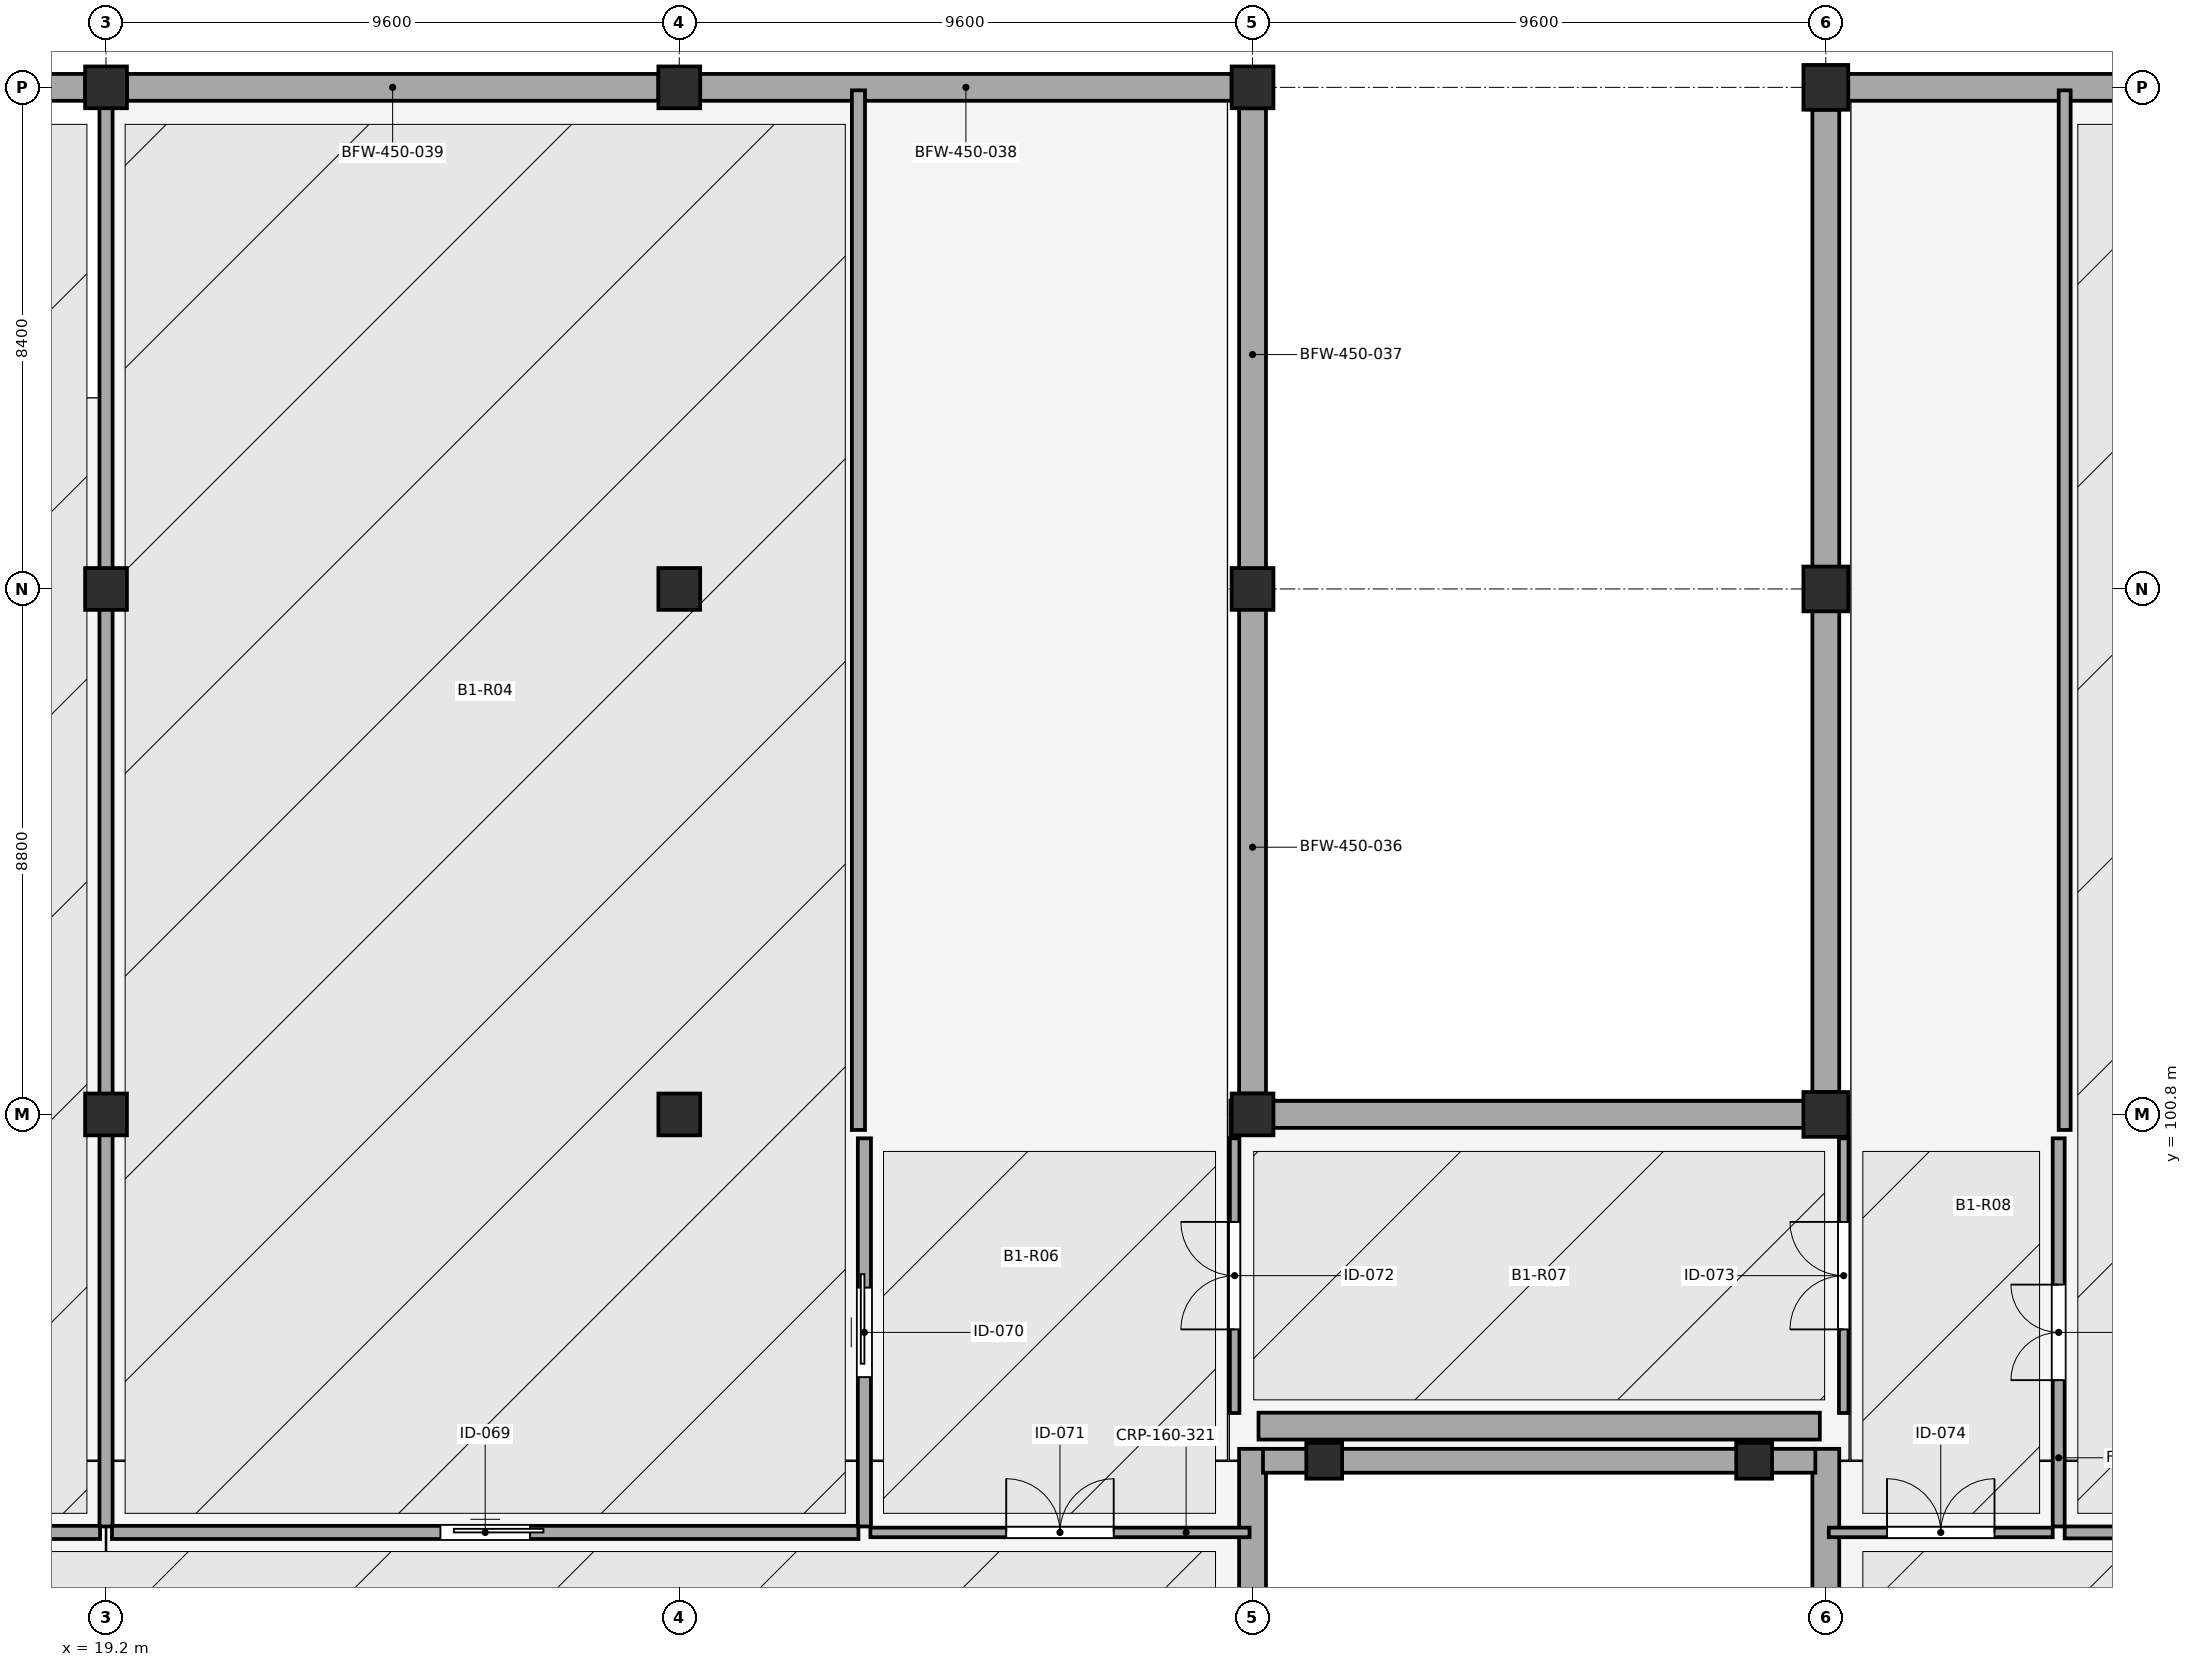
"""IFC4 building model, lengths in metres.
Left out: names, types, materials, properties, quantities, classifications, styles, units other than length and angle.
Written with IfcOpenShell. Run it as: python <this file> out.ifc"""

import sys

from ifc_helpers import new_model, si_unit, direction, frame, frame_2d, origin, origin_2d, place, context, subcontext, project, spatial, rectangle, extrude, element, fill, save


model = new_model("IFC4")
c1 = context("Model", 3, precision=1e-05, world=origin(), true_north=direction((0.0, 1.0)))
c2 = subcontext(c1, "Body", "Model", "MODEL_VIEW")
j1 = project(units=[si_unit("LENGTHUNIT", "METRE"), si_unit("PLANEANGLEUNIT", "RADIAN")], contexts=[c1])
p1 = place(None, origin())
s1 = spatial("IfcSite", under=j1, at=p1, CompositionType="ELEMENT")
p2 = place(p1, origin())
s2 = spatial("IfcBuilding", under=s1, at=p2, CompositionType="ELEMENT")
p3 = place(p2, frame((0.0, 0.0, -4.2)))
s3 = spatial("IfcBuildingStorey", under=s2, at=p3, CompositionType="ELEMENT", Elevation=-4.2)
for number, where, z_axis, x_axis in (
    (1, (19.2, 100.8, 0.0), (0.0, 0.0, 1.0), (1.0, 0.0, 0.0)),
    (2, (19.2, 109.6, 0.0), (0.0, 0.0, 1.0), (1.0, 0.0, 0.0)),
    (3, (19.2, 118.0, 0.0), (0.0, 0.0, 1.0), (1.0, 0.0, 0.0)),
    (4, (28.8, 100.8, 0.0), (0.0, 0.0, 1.0), (1.0, 0.0, 0.0)),
    (5, (28.8, 109.6, 0.0), (0.0, 0.0, 1.0), (1.0, 0.0, 0.0)),
    (6, (28.8, 118.0, 0.0), (0.0, 0.0, 1.0), (1.0, 0.0, 0.0)),
    (7, (38.4, 100.8, 0.0), (0.0, 0.0, 1.0), (1.0, 0.0, 0.0)),
    (8, (38.4, 109.6, 0.0), (0.0, 0.0, 1.0), (1.0, 0.0, 0.0)),
    (9, (38.4, 118.0, 0.0), (0.0, 0.0, 1.0), (1.0, 0.0, 0.0)),
):
    element("IfcColumn", number, at=place(p3, frame(where, z_axis=z_axis, x_axis=x_axis)), inside=s3, PredefinedType="COLUMN", context=c2, shape_type="SweptSolid", body=[
        extrude(rectangle(XDim=0.7, YDim=0.7, at=origin_2d()), origin(), (0.0, 0.0, 1.0), 4.2),
    ])
for number, where, z_axis, x_axis in (
    (10, (48.0, 100.8, 0.0), (0.0, 0.0, 1.0), (1.0, 0.0, 0.0)),
    (11, (48.0, 109.6, 0.0), (0.0, 0.0, 1.0), (1.0, 0.0, 0.0)),
    (12, (48.0, 118.0, 0.0), (0.0, 0.0, 1.0), (1.0, 0.0, 0.0)),
):
    element("IfcColumn", number, at=place(p3, frame(where, z_axis=z_axis, x_axis=x_axis)), inside=s3, PredefinedType="COLUMN", context=c2, shape_type="SweptSolid", body=[
        extrude(rectangle(XDim=0.75, YDim=0.75, at=origin_2d()), origin(), (0.0, 0.0, 1.0), 4.2),
    ])
for number, where, z_axis, x_axis in (
    (13, (39.6, 95.0, 0.0), (0.0, 0.0, 1.0), (1.0, 0.0, 0.0)),
    (14, (46.8, 95.0, 0.0), (0.0, 0.0, 1.0), (1.0, 0.0, 0.0)),
):
    element("IfcColumn", number, at=place(p3, frame(where, z_axis=z_axis, x_axis=x_axis)), inside=s3, PredefinedType="COLUMN", context=c2, shape_type="SweptSolid", body=[
        extrude(rectangle(XDim=0.6, YDim=0.6, at=origin_2d()), origin(), (0.0, 0.0, 1.0), 4.2),
    ])
p4 = place(p3, frame((38.4, 87.467, 0.0), z_axis=(0.0, 0.0, 1.0), x_axis=(0.0, 1.0, 0.0)))
e15 = element("IfcWall", 15, at=p4, inside=s3, PredefinedType="SOLIDWALL", context=c2, shape_type="SweptSolid", body=[
    extrude(rectangle(XDim=7.733, YDim=0.45, at=frame_2d((3.866, 0.0))), origin(), (0.0, 0.0, 1.0), 3.84),
])
for number, where, z_axis, x_axis in (
    (16, (38.4, 101.15, 0.0), (0.0, 0.0, 1.0), (0.0, 1.0, 0.0)),
    (17, (38.4, 109.4, 0.0), (0.0, 0.0, 1.0), (0.0, 1.0, 0.0)),
):
    element("IfcWall", number, at=place(p3, frame(where, z_axis=z_axis, x_axis=x_axis)), inside=s3, PredefinedType="SOLIDWALL", context=c2, shape_type="SweptSolid", body=[
        extrude(rectangle(XDim=8.25, YDim=0.45, at=frame_2d((4.125, 0.0))), origin(), (0.0, 0.0, 1.0), 3.84),
    ])
p5 = place(p3, frame((38.05, 118.0, 0.0), z_axis=(0.0, 0.0, 1.0), x_axis=(-1.0, 0.0, 0.0)))
e18 = element("IfcWall", 18, at=p5, inside=s3, PredefinedType="SOLIDWALL", context=c2, shape_type="SweptSolid", body=[
    extrude(rectangle(XDim=8.9, YDim=0.45, at=frame_2d((4.45, 0.0))), origin(), (0.0, 0.0, 1.0), 3.84),
])
p6 = place(p3, frame((28.45, 118.0, 0.0), z_axis=(0.0, 0.0, 1.0), x_axis=(-1.0, 0.0, 0.0)))
e19 = element("IfcWall", 19, at=p6, inside=s3, PredefinedType="SOLIDWALL", context=c2, shape_type="SweptSolid", body=[
    extrude(rectangle(XDim=8.9, YDim=0.45, at=frame_2d((4.45, 0.0))), origin(), (0.0, 0.0, 1.0), 3.84),
])
p7 = place(p3, frame((18.85, 118.0, 0.0), z_axis=(0.0, 0.0, 1.0), x_axis=(-1.0, 0.0, 0.0)))
e20 = element("IfcWall", 20, at=p7, inside=s3, PredefinedType="SOLIDWALL", context=c2, shape_type="SweptSolid", body=[
    extrude(rectangle(XDim=8.9, YDim=0.45, at=frame_2d((4.45, 0.0))), origin(), (0.0, 0.0, 1.0), 3.84),
])
p8 = place(p3, frame((57.225, 118.0, 0.0), z_axis=(0.0, 0.0, 1.0), x_axis=(-1.0, 0.0, 0.0)))
e21 = element("IfcWall", 21, at=p8, inside=s3, PredefinedType="SOLIDWALL", context=c2, shape_type="SweptSolid", body=[
    extrude(rectangle(XDim=8.85, YDim=0.45, at=frame_2d((4.425, 0.0))), origin(), (0.0, 0.0, 1.0), 3.84),
])
p9 = place(p3, frame((48.0, 117.625, 0.0), z_axis=(0.0, 0.0, 1.0), x_axis=(0.0, -1.0, 0.0)))
e22 = element("IfcWall", 22, at=p9, inside=s3, PredefinedType="SOLIDWALL", context=c2, shape_type="SweptSolid", body=[
    extrude(rectangle(XDim=8.225, YDim=0.45, at=frame_2d((4.113, 0.0))), origin(), (0.0, 0.0, 1.0), 3.84),
])
p10 = place(p3, frame((48.0, 109.4, 0.0), z_axis=(0.0, 0.0, 1.0), x_axis=(0.0, -1.0, 0.0)))
e23 = element("IfcWall", 23, at=p10, inside=s3, PredefinedType="SOLIDWALL", context=c2, shape_type="SweptSolid", body=[
    extrude(rectangle(XDim=8.225, YDim=0.45, at=frame_2d((4.112, 0.0))), origin(), (0.0, 0.0, 1.0), 3.84),
])
p11 = place(p3, frame((48.0, 95.2, 0.0), z_axis=(0.0, 0.0, 1.0), x_axis=(0.0, -1.0, 0.0)))
e24 = element("IfcWall", 24, at=p11, inside=s3, PredefinedType="SOLIDWALL", context=c2, shape_type="SweptSolid", body=[
    extrude(rectangle(XDim=7.733, YDim=0.45, at=frame_2d((3.866, 0.0))), origin(), (0.0, 0.0, 1.0), 3.84),
])
for number, where, z_axis, x_axis in (
    (25, (38.5, 95.58, 0.0), (0.0, 0.0, 1.0), (1.0, 0.0, 0.0)),
    (26, (38.5, 100.8, 0.0), (0.0, 0.0, 1.0), (1.0, 0.0, 0.0)),
):
    element("IfcWall", number, at=place(p3, frame(where, z_axis=z_axis, x_axis=x_axis)), inside=s3, PredefinedType="SOLIDWALL", context=c2, shape_type="SweptSolid", body=[
        extrude(rectangle(XDim=9.4, YDim=0.45, at=frame_2d((4.7, 0.0))), origin(), (0.0, 0.0, 1.0), 3.84),
    ])
p12 = place(p3, frame((38.575, 95.0, 0.0), z_axis=(0.0, 0.0, 1.0), x_axis=(1.0, 0.0, 0.0)))
e27 = element("IfcWall", 27, at=p12, inside=s3, PredefinedType="SOLIDWALL", context=c2, shape_type="SweptSolid", body=[
    extrude(rectangle(XDim=9.25, YDim=0.4, at=frame_2d((4.625, 0.0))), origin(), (0.0, 0.0, 1.0), 9.0),
])
p13 = place(p3, frame((19.2, 93.9, 0.0), z_axis=(0.0, 0.0, 1.0), x_axis=(0.0, 1.0, 0.0)))
e28 = element("IfcWall", 28, at=p13, inside=s3, PredefinedType="PARTITIONING", context=c2, shape_type="SweptSolid", body=[
    extrude(rectangle(XDim=24.05, YDim=0.22, at=frame_2d((12.025, 0.0))), origin(), (0.0, 0.0, 1.0), 2.952),
])
p14 = place(p3, frame((0.05, 93.8, 0.0), z_axis=(0.0, 0.0, 1.0), x_axis=(1.0, 0.0, 0.0)))
e29 = element("IfcWall", 29, at=p14, inside=s3, PredefinedType="PARTITIONING", context=c2, shape_type="SweptSolid", body=[
    extrude(rectangle(XDim=19.05, YDim=0.22, at=frame_2d((9.525, 0.0))), origin(), (0.0, 0.0, 1.0), 3.84),
])
p15 = place(p14, frame((8.775, 0.0, 0.0)))
e30 = element("IfcOpeningElement", 30, at=p15, cuts=e29, PredefinedType="OPENING", context=c2, shape_type="SweptSolid", body=[
    extrude(rectangle(XDim=1.5, YDim=2.2, at=frame_2d((0.75, 1.1))), frame((0.0, 0.12, 0.0), z_axis=(0.0, -1.0, 0.0), x_axis=(1.0, 0.0, 0.0)), (0.0, 0.0, 1.0), 0.24),
])
p16 = place(p3, frame((19.3, 93.8, 0.0), z_axis=(0.0, 0.0, 1.0), x_axis=(1.0, 0.0, 0.0)))
e31 = element("IfcWall", 31, at=p16, inside=s3, PredefinedType="PARTITIONING", context=c2, shape_type="SweptSolid", body=[
    extrude(rectangle(XDim=12.5, YDim=0.22, at=frame_2d((6.25, 0.0))), origin(), (0.0, 0.0, 1.0), 3.84),
])
p17 = place(p16, frame((5.5, 0.0, 0.0)))
e32 = element("IfcOpeningElement", 32, at=p17, cuts=e31, PredefinedType="OPENING", context=c2, shape_type="SweptSolid", body=[
    extrude(rectangle(XDim=1.5, YDim=2.2, at=frame_2d((0.75, 1.1))), frame((0.0, 0.12, 0.0), z_axis=(0.0, -1.0, 0.0), x_axis=(1.0, 0.0, 0.0)), (0.0, 0.0, 1.0), 0.24),
])
p18 = place(p3, frame((31.9, 93.9, 0.0), z_axis=(0.0, 0.0, 1.0), x_axis=(0.0, 1.0, 0.0)))
e33 = element("IfcWall", 33, at=p18, inside=s3, PredefinedType="PARTITIONING", context=c2, shape_type="SweptSolid", body=[
    extrude(rectangle(XDim=6.5, YDim=0.22, at=frame_2d((3.25, 0.0))), origin(), (0.0, 0.0, 1.0), 3.84),
])
p19 = place(p18, frame((2.5, 0.0, 0.0)))
e34 = element("IfcOpeningElement", 34, at=p19, cuts=e33, PredefinedType="OPENING", context=c2, shape_type="SweptSolid", body=[
    extrude(rectangle(XDim=1.5, YDim=2.2, at=frame_2d((0.75, 1.1))), frame((0.0, 0.12, 0.0), z_axis=(0.0, -1.0, 0.0), x_axis=(1.0, 0.0, 0.0)), (0.0, 0.0, 1.0), 0.24),
])
p20 = place(p3, frame((32.0, 93.8, 0.0), z_axis=(0.0, 0.0, 1.0), x_axis=(1.0, 0.0, 0.0)))
e35 = element("IfcWall", 35, at=p20, inside=s3, PredefinedType="PARTITIONING", context=c2, shape_type="SweptSolid", body=[
    extrude(rectangle(XDim=6.35, YDim=0.16, at=frame_2d((3.175, 0.0))), origin(), (0.0, 0.0, 1.0), 3.84),
])
p21 = place(p20, frame((2.275, 0.0, 0.0)))
e36 = element("IfcOpeningElement", 36, at=p21, cuts=e35, PredefinedType="OPENING", context=c2, shape_type="SweptSolid", body=[
    extrude(rectangle(XDim=1.8, YDim=2.15, at=frame_2d((0.9, 1.075))), frame((0.0, 0.09, 0.0), z_axis=(0.0, -1.0, 0.0), x_axis=(1.0, 0.0, 0.0)), (0.0, 0.0, 1.0), 0.18),
])
p22 = place(p3, frame((38.1, 95.8, 0.0), z_axis=(0.0, 0.0, 1.0), x_axis=(0.0, 1.0, 0.0)))
e37 = element("IfcWall", 37, at=p22, inside=s3, PredefinedType="PARTITIONING", context=c2, shape_type="SweptSolid", body=[
    extrude(rectangle(XDim=4.6, YDim=0.16, at=frame_2d((2.3, 0.0))), origin(), (0.0, 0.0, 1.0), 3.84),
])
p23 = place(p22, frame((1.4, 0.0, 0.0)))
e38 = element("IfcOpeningElement", 38, at=p23, cuts=e37, PredefinedType="OPENING", context=c2, shape_type="SweptSolid", body=[
    extrude(rectangle(XDim=1.8, YDim=2.15, at=frame_2d((0.9, 1.075))), frame((0.0, 0.09, 0.0), z_axis=(0.0, -1.0, 0.0), x_axis=(1.0, 0.0, 0.0)), (0.0, 0.0, 1.0), 0.18),
])
p24 = place(p3, frame((48.3, 95.8, 0.0), z_axis=(0.0, 0.0, 1.0), x_axis=(0.0, 1.0, 0.0)))
e39 = element("IfcWall", 39, at=p24, inside=s3, PredefinedType="PARTITIONING", context=c2, shape_type="SweptSolid", body=[
    extrude(rectangle(XDim=4.6, YDim=0.16, at=frame_2d((2.3, 0.0))), origin(), (0.0, 0.0, 1.0), 3.84),
])
p25 = place(p24, frame((1.4, 0.0, 0.0)))
e40 = element("IfcOpeningElement", 40, at=p25, cuts=e39, PredefinedType="OPENING", context=c2, shape_type="SweptSolid", body=[
    extrude(rectangle(XDim=1.8, YDim=2.15, at=frame_2d((0.9, 1.075))), frame((0.0, 0.09, 0.0), z_axis=(0.0, -1.0, 0.0), x_axis=(1.0, 0.0, 0.0)), (0.0, 0.0, 1.0), 0.18),
])
p26 = place(p3, frame((48.05, 93.8, 0.0), z_axis=(0.0, 0.0, 1.0), x_axis=(1.0, 0.0, 0.0)))
e41 = element("IfcWall", 41, at=p26, inside=s3, PredefinedType="PARTITIONING", context=c2, shape_type="SweptSolid", body=[
    extrude(rectangle(XDim=3.75, YDim=0.16, at=frame_2d((1.875, 0.0))), origin(), (0.0, 0.0, 1.0), 3.84),
])
p27 = place(p26, frame((0.975, 0.0, 0.0)))
e42 = element("IfcOpeningElement", 42, at=p27, cuts=e41, PredefinedType="OPENING", context=c2, shape_type="SweptSolid", body=[
    extrude(rectangle(XDim=1.8, YDim=2.15, at=frame_2d((0.9, 1.075))), frame((0.0, 0.09, 0.0), z_axis=(0.0, -1.0, 0.0), x_axis=(1.0, 0.0, 0.0)), (0.0, 0.0, 1.0), 0.18),
])
p28 = place(p3, frame((51.9, 93.9, 0.0), z_axis=(0.0, 0.0, 1.0), x_axis=(0.0, 1.0, 0.0)))
e43 = element("IfcWall", 43, at=p28, inside=s3, PredefinedType="PARTITIONING", context=c2, shape_type="SweptSolid", body=[
    extrude(rectangle(XDim=6.5, YDim=0.2, at=frame_2d((3.25, 0.0))), origin(), (0.0, 0.0, 1.0), 3.84),
])
p29 = place(p28, frame((2.45, 0.0, 0.0)))
e44 = element("IfcOpeningElement", 44, at=p29, cuts=e43, PredefinedType="OPENING", context=c2, shape_type="SweptSolid", body=[
    extrude(rectangle(XDim=1.6, YDim=2.2, at=frame_2d((0.8, 1.1))), frame((0.0, 0.11, 0.0), z_axis=(0.0, -1.0, 0.0), x_axis=(1.0, 0.0, 0.0)), (0.0, 0.0, 1.0), 0.22),
])
p30 = place(p3, frame((52.0, 93.8, 0.0), z_axis=(0.0, 0.0, 1.0), x_axis=(1.0, 0.0, 0.0)))
e45 = element("IfcWall", 45, at=p30, inside=s3, PredefinedType="PARTITIONING", context=c2, shape_type="SweptSolid", body=[
    extrude(rectangle(XDim=15.1, YDim=0.2, at=frame_2d((7.55, 0.0))), origin(), (0.0, 0.0, 1.0), 3.84),
])
p31 = place(p30, frame((6.75, 0.0, 0.0)))
e46 = element("IfcOpeningElement", 46, at=p31, cuts=e45, PredefinedType="OPENING", context=c2, shape_type="SweptSolid", body=[
    extrude(rectangle(XDim=1.6, YDim=2.2, at=frame_2d((0.8, 1.1))), frame((0.0, 0.11, 0.0), z_axis=(0.0, -1.0, 0.0), x_axis=(1.0, 0.0, 0.0)), (0.0, 0.0, 1.0), 0.22),
])
p32 = place(p3, frame((31.8, 100.54, 0.0), z_axis=(0.0, 0.0, 1.0), x_axis=(0.0, 1.0, 0.0)))
e47 = element("IfcWall", 47, at=p32, inside=s3, PredefinedType="PARTITIONING", context=c2, shape_type="SweptSolid", body=[
    extrude(rectangle(XDim=17.41, YDim=0.22, at=frame_2d((8.705, 0.0))), origin(), (0.0, 0.0, 1.0), 3.84),
])
p33 = place(p3, frame((52.0, 100.54, 0.0), z_axis=(0.0, 0.0, 1.0), x_axis=(0.0, 1.0, 0.0)))
e48 = element("IfcWall", 48, at=p33, inside=s3, PredefinedType="PARTITIONING", context=c2, shape_type="SweptSolid", body=[
    extrude(rectangle(XDim=17.41, YDim=0.2, at=frame_2d((8.705, 0.0))), origin(), (0.0, 0.0, 1.0), 3.84),
])
p34 = place(p17, origin())
e49 = element("IfcDoor", 49, at=p34, inside=s3, OperationType="SLIDING_TO_RIGHT", PredefinedType="DOOR", context=c2, shape_type="SweptSolid", body=[
    extrude(rectangle(XDim=1.5, YDim=2.2, at=frame_2d((0.75, 1.1))), frame((0.0, 0.025, 0.0), z_axis=(0.0, -1.0, 0.0), x_axis=(1.0, 0.0, 0.0)), (0.0, 0.0, 1.0), 0.05),
])
fill(e32, e49)
p35 = place(p19, origin())
e50 = element("IfcDoor", 50, at=p35, inside=s3, OperationType="SLIDING_TO_RIGHT", PredefinedType="DOOR", context=c2, shape_type="SweptSolid", body=[
    extrude(rectangle(XDim=1.5, YDim=2.2, at=frame_2d((0.75, 1.1))), frame((0.0, 0.025, 0.0), z_axis=(0.0, -1.0, 0.0), x_axis=(1.0, 0.0, 0.0)), (0.0, 0.0, 1.0), 0.05),
])
fill(e34, e50)
p36 = place(p21, origin())
e51 = element("IfcDoor", 51, at=p36, inside=s3, OperationType="DOUBLE_DOOR_SINGLE_SWING", PredefinedType="DOOR", context=c2, shape_type="SweptSolid", body=[
    extrude(rectangle(XDim=1.8, YDim=2.15, at=frame_2d((0.9, 1.075))), frame((0.0, 0.025, 0.0), z_axis=(0.0, -1.0, 0.0), x_axis=(1.0, 0.0, 0.0)), (0.0, 0.0, 1.0), 0.05),
])
fill(e36, e51)
p37 = place(p23, origin())
e52 = element("IfcDoor", 52, at=p37, inside=s3, OperationType="DOUBLE_DOOR_SINGLE_SWING", PredefinedType="DOOR", context=c2, shape_type="SweptSolid", body=[
    extrude(rectangle(XDim=1.8, YDim=2.15, at=frame_2d((0.9, 1.075))), frame((0.0, 0.025, 0.0), z_axis=(0.0, -1.0, 0.0), x_axis=(1.0, 0.0, 0.0)), (0.0, 0.0, 1.0), 0.05),
])
fill(e38, e52)
p38 = place(p25, origin())
e53 = element("IfcDoor", 53, at=p38, inside=s3, OperationType="DOUBLE_DOOR_SINGLE_SWING", PredefinedType="DOOR", context=c2, shape_type="SweptSolid", body=[
    extrude(rectangle(XDim=1.8, YDim=2.15, at=frame_2d((0.9, 1.075))), frame((0.0, 0.025, 0.0), z_axis=(0.0, -1.0, 0.0), x_axis=(1.0, 0.0, 0.0)), (0.0, 0.0, 1.0), 0.05),
])
fill(e40, e53)
p39 = place(p27, origin())
e54 = element("IfcDoor", 54, at=p39, inside=s3, OperationType="DOUBLE_DOOR_SINGLE_SWING", PredefinedType="DOOR", context=c2, shape_type="SweptSolid", body=[
    extrude(rectangle(XDim=1.8, YDim=2.15, at=frame_2d((0.9, 1.075))), frame((0.0, 0.025, 0.0), z_axis=(0.0, -1.0, 0.0), x_axis=(1.0, 0.0, 0.0)), (0.0, 0.0, 1.0), 0.05),
])
fill(e42, e54)
p40 = place(p29, origin())
e55 = element("IfcDoor", 55, at=p40, inside=s3, OperationType="DOUBLE_DOOR_SINGLE_SWING", PredefinedType="DOOR", context=c2, shape_type="SweptSolid", body=[
    extrude(rectangle(XDim=1.6, YDim=2.2, at=frame_2d((0.8, 1.1))), frame((0.0, 0.025, 0.0), z_axis=(0.0, -1.0, 0.0), x_axis=(1.0, 0.0, 0.0)), (0.0, 0.0, 1.0), 0.05),
])
fill(e44, e55)
save(model, sys.argv[1])
